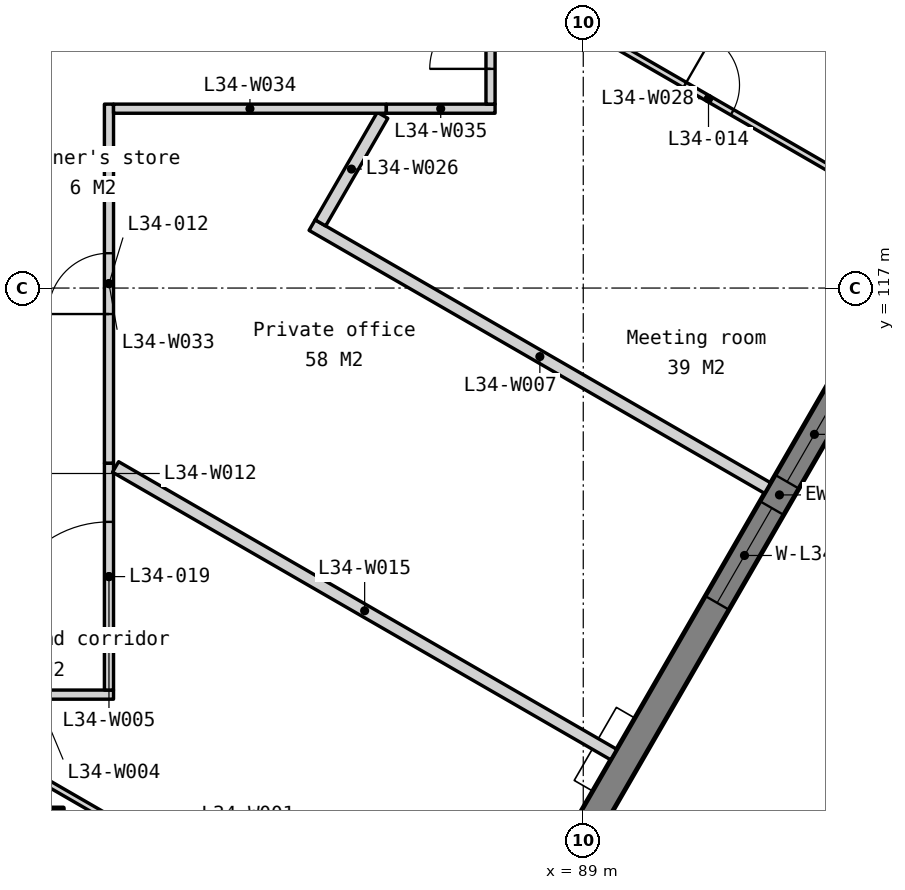
"""IFC4 building model, lengths in metres.
Left out: names, types, materials, properties, quantities, classifications, styles, units other than length and angle.
Written with IfcOpenShell. Run it as: python <this file> out.ifc"""

import sys

from ifc_helpers import new_model, si_unit, direction, frame, frame_2d, origin, origin_2d, place, context, subcontext, project, spatial, polyline, rectangle, outline, extrude, element, fill, save


model = new_model("IFC4")
c1 = context("Model", 3, precision=1e-05, world=origin(), true_north=direction((0.0, 1.0)))
c2 = subcontext(c1, "Body", "Model", "MODEL_VIEW")
j1 = project(units=[si_unit("LENGTHUNIT", "METRE"), si_unit("PLANEANGLEUNIT", "RADIAN")], contexts=[c1])
p1 = place(None, origin())
s1 = spatial("IfcSite", under=j1, at=p1, CompositionType="ELEMENT")
p2 = place(p1, origin())
s2 = spatial("IfcBuilding", under=s1, at=p2, CompositionType="ELEMENT")
p3 = place(p2, frame((0.0, 0.0, 136.4)))
s3 = spatial("IfcBuildingStorey", under=s2, at=p3, CompositionType="ELEMENT", Elevation=136.4)
p4 = place(p3, frame((80.0, 108.0, 0.0), z_axis=(0.0, 0.0, 1.0), x_axis=(1.0, 0.0, 0.0)))
e1 = element("IfcColumn", 1, at=p4, inside=s3, PredefinedType="COLUMN", context=c2, shape_type="SweptSolid", body=[
    extrude(rectangle(XDim=0.9, YDim=0.9, at=origin_2d()), origin(), (0.0, 0.0, 1.0), 3.9),
])
p5 = place(p3, frame((82.105, 96.067, -0.15), z_axis=(0.0, 0.0, 1.0), x_axis=(0.499997369791, 0.866026922331, 0.0)))
e2 = element("IfcWall", 2, at=p5, inside=s3, PredefinedType="SOLIDWALL", context=c2, shape_type="SweptSolid", body=[
    extrude(outline(polyline([(40.486, 0.0), (40.486, 3.9), (0.0, 3.9), (0.0, 0.0), (40.486, 0.0)])), frame((0.0, 0.225, 0.0), z_axis=(0.0, -1.0, 0.0), x_axis=(1.0, 0.0, 0.0)), (0.0, 0.0, 1.0), 0.45),
])
p6 = place(p5, frame((0.87, 0.0, 0.95)))
e3 = element("IfcOpeningElement", 3, at=p6, cuts=e2, PredefinedType="OPENING", context=c2, shape_type="SweptSolid", body=[
    extrude(rectangle(XDim=1.2, YDim=2.2, at=frame_2d((0.6, 1.1))), frame((0.0, 0.235, 0.0), z_axis=(0.0, -1.0, 0.0), x_axis=(1.0, 0.0, 0.0)), (0.0, 0.0, 1.0), 0.47),
])
p7 = place(p5, frame((8.072, 0.0, 0.95)))
e4 = element("IfcOpeningElement", 4, at=p7, cuts=e2, PredefinedType="OPENING", context=c2, shape_type="SweptSolid", body=[
    extrude(rectangle(XDim=1.8, YDim=2.2, at=frame_2d((0.9, 1.1))), frame((0.0, 0.235, 0.0), z_axis=(0.0, -1.0, 0.0), x_axis=(1.0, 0.0, 0.0)), (0.0, 0.0, 1.0), 0.47),
])
p8 = place(p5, frame((10.372, 0.0, 0.95)))
e5 = element("IfcOpeningElement", 5, at=p8, cuts=e2, PredefinedType="OPENING", context=c2, shape_type="SweptSolid", body=[
    extrude(rectangle(XDim=1.8, YDim=2.2, at=frame_2d((0.9, 1.1))), frame((0.0, 0.235, 0.0), z_axis=(0.0, -1.0, 0.0), x_axis=(1.0, 0.0, 0.0)), (0.0, 0.0, 1.0), 0.47),
])
p9 = place(p5, frame((18.193, 0.0, 0.95)))
e6 = element("IfcOpeningElement", 6, at=p9, cuts=e2, PredefinedType="OPENING", context=c2, shape_type="SweptSolid", body=[
    extrude(rectangle(XDim=1.8, YDim=2.2, at=frame_2d((0.9, 1.1))), frame((0.0, 0.235, 0.0), z_axis=(0.0, -1.0, 0.0), x_axis=(1.0, 0.0, 0.0)), (0.0, 0.0, 1.0), 0.47),
])
p10 = place(p5, frame((20.493, 0.0, 0.95)))
e7 = element("IfcOpeningElement", 7, at=p10, cuts=e2, PredefinedType="OPENING", context=c2, shape_type="SweptSolid", body=[
    extrude(rectangle(XDim=1.8, YDim=2.2, at=frame_2d((0.9, 1.1))), frame((0.0, 0.235, 0.0), z_axis=(0.0, -1.0, 0.0), x_axis=(1.0, 0.0, 0.0)), (0.0, 0.0, 1.0), 0.47),
])
p11 = place(p5, frame((28.315, 0.0, 0.95)))
e8 = element("IfcOpeningElement", 8, at=p11, cuts=e2, PredefinedType="OPENING", context=c2, shape_type="SweptSolid", body=[
    extrude(rectangle(XDim=1.8, YDim=2.2, at=frame_2d((0.9, 1.1))), frame((0.0, 0.235, 0.0), z_axis=(0.0, -1.0, 0.0), x_axis=(1.0, 0.0, 0.0)), (0.0, 0.0, 1.0), 0.47),
])
p12 = place(p5, frame((30.615, 0.0, 0.95)))
e9 = element("IfcOpeningElement", 9, at=p12, cuts=e2, PredefinedType="OPENING", context=c2, shape_type="SweptSolid", body=[
    extrude(rectangle(XDim=1.8, YDim=2.2, at=frame_2d((0.9, 1.1))), frame((0.0, 0.235, 0.0), z_axis=(0.0, -1.0, 0.0), x_axis=(1.0, 0.0, 0.0)), (0.0, 0.0, 1.0), 0.47),
])
p13 = place(p5, frame((38.417, 0.0, 0.95)))
e10 = element("IfcOpeningElement", 10, at=p13, cuts=e2, PredefinedType="OPENING", context=c2, shape_type="SweptSolid", body=[
    extrude(rectangle(XDim=1.2, YDim=2.2, at=frame_2d((0.6, 1.1))), frame((0.0, 0.235, 0.0), z_axis=(0.0, -1.0, 0.0), x_axis=(1.0, 0.0, 0.0)), (0.0, 0.0, 1.0), 0.47),
])
p14 = place(p3, frame((80.0, 108.969, 0.0), z_axis=(0.0, 0.0, 1.0), x_axis=(0.86602648383, -0.499998129301, 0.0)))
e11 = element("IfcWall", 11, at=p14, inside=s3, PredefinedType="PARTITIONING", context=c2, shape_type="SweptSolid", body=[
    extrude(rectangle(XDim=8.049, YDim=0.1, at=frame_2d((4.025, 0.0))), origin(), (0.0, 0.0, 1.0), 3.75),
])
p15 = place(p14, frame((3.525, 0.0, 0.0)))
e12 = element("IfcOpeningElement", 12, at=p15, cuts=e11, PredefinedType="OPENING", context=c2, shape_type="SweptSolid", body=[
    extrude(rectangle(XDim=1.0, YDim=2.1, at=frame_2d((0.5, 1.05))), frame((0.0, 0.06, 0.0), z_axis=(0.0, -1.0, 0.0), x_axis=(1.0, 0.0, 0.0)), (0.0, 0.0, 1.0), 0.12),
])
p16 = place(p3, frame((78.725, 110.313, 0.0), z_axis=(0.0, 0.0, 1.0), x_axis=(1.0, 0.0, 0.0)))
e13 = element("IfcWall", 13, at=p16, inside=s3, PredefinedType="PARTITIONING", context=c2, shape_type="SweptSolid", body=[
    extrude(rectangle(XDim=2.55, YDim=0.15, at=frame_2d((1.275, 0.0))), origin(), (0.0, 0.0, 1.0), 3.75),
])
p17 = place(p3, frame((81.2, 110.388, 0.0), z_axis=(0.0, 0.0, 1.0), x_axis=(0.0, 1.0, 0.0)))
e14 = element("IfcWall", 14, at=p17, inside=s3, PredefinedType="PARTITIONING", context=c2, shape_type="SweptSolid", body=[
    extrude(rectangle(XDim=3.732, YDim=0.15, at=frame_2d((1.866, 0.0))), origin(), (0.0, 0.0, 1.0), 3.75),
])
p18 = place(p17, frame((0.966, 0.0, 0.0)))
e15 = element("IfcOpeningElement", 15, at=p18, cuts=e14, PredefinedType="OPENING", context=c2, shape_type="SweptSolid", body=[
    extrude(rectangle(XDim=1.8, YDim=2.1, at=frame_2d((0.9, 1.05))), frame((0.0, 0.085, 0.0), z_axis=(0.0, -1.0, 0.0), x_axis=(1.0, 0.0, 0.0)), (0.0, 0.0, 1.0), 0.17),
])
p19 = place(p3, frame((84.541, 118.035, 0.0), z_axis=(0.0, 0.0, 1.0), x_axis=(0.866023427642, -0.500003422764, 0.0)))
e16 = element("IfcWall", 16, at=p19, inside=s3, PredefinedType="PARTITIONING", context=c2, shape_type="SweptSolid", body=[
    extrude(rectangle(XDim=8.65, YDim=0.2, at=frame_2d((4.325, 0.0))), origin(), (0.0, 0.0, 1.0), 3.75),
])
p20 = place(p3, frame((81.308, 114.058, 0.0), z_axis=(0.0, 0.0, 1.0), x_axis=(0.866017555821, -0.500013592824, 0.0)))
e17 = element("IfcWall", 17, at=p20, inside=s3, PredefinedType="PARTITIONING", context=c2, shape_type="SweptSolid", body=[
    extrude(rectangle(XDim=9.461, YDim=0.2, at=frame_2d((4.73, 0.0))), origin(), (0.0, 0.0, 1.0), 3.75),
])
p21 = place(p3, frame((84.677, 118.072, 0.0), z_axis=(0.0, 0.0, 1.0), x_axis=(0.500018862428, 0.866014513283, 0.0)))
e18 = element("IfcWall", 18, at=p21, inside=s3, PredefinedType="PARTITIONING", context=c2, shape_type="SweptSolid", body=[
    extrude(rectangle(XDim=2.044, YDim=0.2, at=frame_2d((1.022, 0.0))), origin(), (0.0, 0.0, 1.0), 3.75),
])
p22 = place(p3, frame((87.557, 122.137, 0.0), z_axis=(0.0, 0.0, 1.0), x_axis=(0.866029768103, -0.499992440702, 0.0)))
e19 = element("IfcWall", 19, at=p22, inside=s3, PredefinedType="PARTITIONING", context=c2, shape_type="SweptSolid", body=[
    extrude(rectangle(XDim=8.089, YDim=0.1, at=frame_2d((4.044, 0.0))), origin(), (0.0, 0.0, 1.0), 3.75),
])
p23 = place(p22, frame((3.594, 0.0, 0.0)))
e20 = element("IfcOpeningElement", 20, at=p23, cuts=e19, PredefinedType="OPENING", context=c2, shape_type="SweptSolid", body=[
    extrude(rectangle(XDim=0.9, YDim=2.1, at=frame_2d((0.45, 1.05))), frame((0.0, 0.06, 0.0), z_axis=(0.0, -1.0, 0.0), x_axis=(1.0, 0.0, 0.0)), (0.0, 0.0, 1.0), 0.12),
])
p24 = place(p3, frame((81.2, 114.12, 0.0), z_axis=(0.0, 0.0, 1.0), x_axis=(0.0, 1.0, 0.0)))
e21 = element("IfcWall", 21, at=p24, inside=s3, PredefinedType="PARTITIONING", context=c2, shape_type="SweptSolid", body=[
    extrude(rectangle(XDim=5.905, YDim=0.15, at=frame_2d((2.952, 0.0))), origin(), (0.0, 0.0, 1.0), 3.75),
])
p25 = place(p24, frame((2.452, 0.0, 0.0)))
e22 = element("IfcOpeningElement", 22, at=p25, cuts=e21, PredefinedType="OPENING", context=c2, shape_type="SweptSolid", body=[
    extrude(rectangle(XDim=1.0, YDim=2.1, at=frame_2d((0.5, 1.05))), frame((0.0, 0.085, 0.0), z_axis=(0.0, -1.0, 0.0), x_axis=(1.0, 0.0, 0.0)), (0.0, 0.0, 1.0), 0.17),
])
p26 = place(p3, frame((81.275, 119.95, 0.0), z_axis=(0.0, 0.0, 1.0), x_axis=(1.0, 0.0, 0.0)))
e23 = element("IfcWall", 23, at=p26, inside=s3, PredefinedType="PARTITIONING", context=c2, shape_type="SweptSolid", body=[
    extrude(rectangle(XDim=4.487, YDim=0.15, at=frame_2d((2.243, 0.0))), origin(), (0.0, 0.0, 1.0), 3.75),
])
p27 = place(p3, frame((85.762, 119.95, 0.0), z_axis=(0.0, 0.0, 1.0), x_axis=(1.0, 0.0, 0.0)))
e24 = element("IfcWall", 24, at=p27, inside=s3, PredefinedType="PARTITIONING", context=c2, shape_type="SweptSolid", body=[
    extrude(rectangle(XDim=1.788, YDim=0.15, at=frame_2d((0.894, 0.0))), origin(), (0.0, 0.0, 1.0), 3.75),
])
p28 = place(p3, frame((87.475, 120.025, 0.0), z_axis=(0.0, 0.0, 1.0), x_axis=(0.0, 1.0, 0.0)))
e25 = element("IfcWall", 25, at=p28, inside=s3, PredefinedType="PARTITIONING", context=c2, shape_type="SweptSolid", body=[
    extrude(rectangle(XDim=2.16, YDim=0.15, at=frame_2d((1.08, 0.0))), origin(), (0.0, 0.0, 1.0), 3.75),
])
p29 = place(p28, frame((0.58, 0.0, 0.0)))
e26 = element("IfcOpeningElement", 26, at=p29, cuts=e25, PredefinedType="OPENING", context=c2, shape_type="SweptSolid", body=[
    extrude(rectangle(XDim=1.0, YDim=2.1, at=frame_2d((0.5, 1.05))), frame((0.0, 0.085, 0.0), z_axis=(0.0, -1.0, 0.0), x_axis=(1.0, 0.0, 0.0)), (0.0, 0.0, 1.0), 0.17),
])
p30 = place(p9, origin())
e27 = element("IfcWindow", 27, at=p30, inside=s3, PartitioningType="SINGLE_PANEL", PredefinedType="WINDOW", context=c2, shape_type="SweptSolid", body=[
    extrude(rectangle(XDim=1.8, YDim=2.2, at=frame_2d((0.9, 1.1))), frame((0.0, 0.03, 0.0), z_axis=(0.0, -1.0, 0.0), x_axis=(1.0, 0.0, 0.0)), (0.0, 0.0, 1.0), 0.06),
])
fill(e6, e27)
p31 = place(p10, origin())
e28 = element("IfcWindow", 28, at=p31, inside=s3, PartitioningType="SINGLE_PANEL", PredefinedType="WINDOW", context=c2, shape_type="SweptSolid", body=[
    extrude(rectangle(XDim=1.8, YDim=2.2, at=frame_2d((0.9, 1.1))), frame((0.0, 0.03, 0.0), z_axis=(0.0, -1.0, 0.0), x_axis=(1.0, 0.0, 0.0)), (0.0, 0.0, 1.0), 0.06),
])
fill(e7, e28)
p32 = place(p25, origin())
e29 = element("IfcDoor", 29, at=p32, inside=s3, OperationType="SINGLE_SWING_LEFT", PredefinedType="DOOR", context=c2, shape_type="SweptSolid", body=[
    extrude(rectangle(XDim=1.0, YDim=2.1, at=frame_2d((0.5, 1.05))), frame((0.0, 0.025, 0.0), z_axis=(0.0, -1.0, 0.0), x_axis=(1.0, 0.0, 0.0)), (0.0, 0.0, 1.0), 0.05),
])
fill(e22, e29)
p33 = place(p29, origin())
e30 = element("IfcDoor", 30, at=p33, inside=s3, OperationType="SINGLE_SWING_LEFT", PredefinedType="DOOR", context=c2, shape_type="SweptSolid", body=[
    extrude(rectangle(XDim=1.0, YDim=2.1, at=frame_2d((0.5, 1.05))), frame((0.0, 0.025, 0.0), z_axis=(0.0, -1.0, 0.0), x_axis=(1.0, 0.0, 0.0)), (0.0, 0.0, 1.0), 0.05),
])
fill(e26, e30)
p34 = place(p23, origin())
e31 = element("IfcDoor", 31, at=p34, inside=s3, OperationType="SINGLE_SWING_LEFT", PredefinedType="DOOR", context=c2, shape_type="SweptSolid", body=[
    extrude(rectangle(XDim=0.9, YDim=2.1, at=frame_2d((0.45, 1.05))), frame((0.0, 0.025, 0.0), z_axis=(0.0, -1.0, 0.0), x_axis=(1.0, 0.0, 0.0)), (0.0, 0.0, 1.0), 0.05),
])
fill(e20, e31)
p35 = place(p18, origin())
e32 = element("IfcDoor", 32, at=p35, inside=s3, OperationType="SINGLE_SWING_LEFT", PredefinedType="DOOR", context=c2, shape_type="SweptSolid", body=[
    extrude(rectangle(XDim=1.8, YDim=2.1, at=frame_2d((0.9, 1.05))), frame((0.0, 0.025, 0.0), z_axis=(0.0, -1.0, 0.0), x_axis=(1.0, 0.0, 0.0)), (0.0, 0.0, 1.0), 0.05),
])
fill(e15, e32)
save(model, sys.argv[1])
